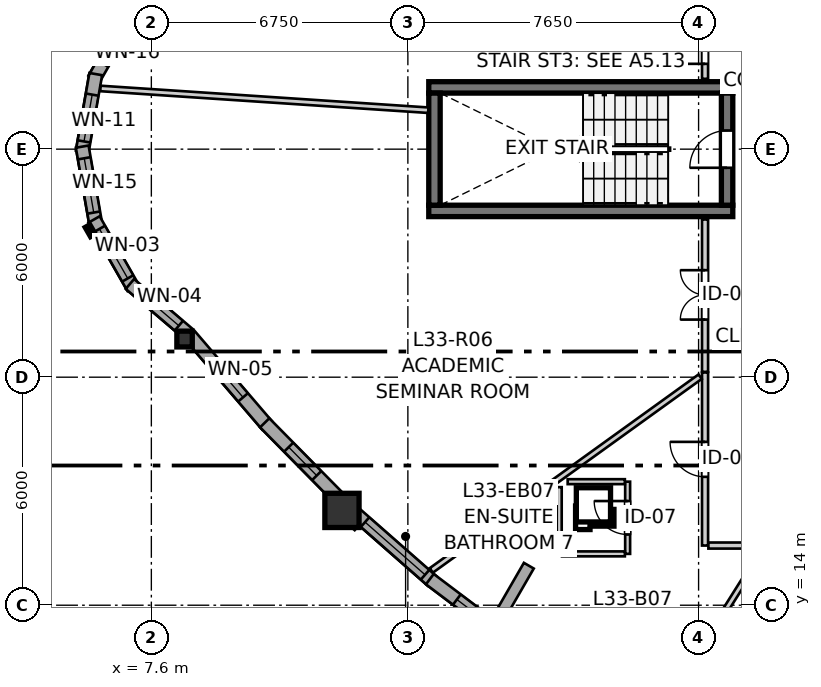
"""IFC4 building model, lengths in metres.
Left out: names, types, materials, properties, quantities, classifications, styles, units other than length and angle.
Written with IfcOpenShell. Run it as: python <this file> out.ifc"""

import sys

from ifc_helpers import new_model, si_unit, direction, frame, frame_2d, origin, origin_2d, place, context, subcontext, project, spatial, rectangle, i_section, extrude, source, transform, mapped, element, fill, save


model = new_model("IFC4")
c1 = context("Model", 3, precision=1e-05, world=origin(), true_north=direction((0.0, 1.0)))
c2 = subcontext(c1, "Body", "Model", "MODEL_VIEW")
j1 = project(units=[si_unit("LENGTHUNIT", "METRE"), si_unit("PLANEANGLEUNIT", "RADIAN")], contexts=[c1])
p1 = place(None, origin())
s1 = spatial("IfcSite", under=j1, at=p1, CompositionType="ELEMENT")
p2 = place(p1, origin())
s2 = spatial("IfcBuilding", under=s1, at=p2, CompositionType="ELEMENT")
p3 = place(p2, frame((0.0, 0.0, 112.0)))
s3 = spatial("IfcBuildingStorey", under=s2, at=p3, CompositionType="ELEMENT", Elevation=112.0)
for number, where, z_axis, x_axis in (
    (1, (14.9, 24.375, 0.0), (0.0, 0.0, 1.0), (1.0, 0.0, 0.0)),
    (2, (22.9, 27.625, 0.0), (0.0, 0.0, 1.0), (-1.0, 0.0, 0.0)),
):
    element("IfcWall", number, at=place(p3, frame(where, z_axis=z_axis, x_axis=x_axis)), inside=s3, PredefinedType="SHEAR", context=c2, shape_type="SweptSolid", body=[
        extrude(rectangle(XDim=8.0, YDim=0.3, at=frame_2d((4.0, 0.0))), origin(), (0.0, 0.0, 1.0), 2.935),
    ])
p4 = place(p3, frame((15.05, 27.475, 0.0), z_axis=(0.0, 0.0, 1.0), x_axis=(0.0, -1.0, 0.0)))
e3 = element("IfcWall", 3, at=p4, inside=s3, PredefinedType="SHEAR", context=c2, shape_type="SweptSolid", body=[
    extrude(rectangle(XDim=2.95, YDim=0.3, at=frame_2d((1.475, 0.0))), origin(), (0.0, 0.0, 1.0), 2.935),
])
p5 = place(p3, frame((22.75, 24.525, 0.0), z_axis=(0.0, 0.0, 1.0), x_axis=(0.0, 1.0, 0.0)))
e4 = element("IfcWall", 4, at=p5, inside=s3, PredefinedType="SHEAR", context=c2, shape_type="SweptSolid", body=[
    extrude(rectangle(XDim=2.95, YDim=0.3, at=frame_2d((1.475, 0.0))), origin(), (0.0, 0.0, 1.0), 2.935),
])
p6 = place(p5, frame((0.985, 0.0, 0.0)))
e5 = element("IfcOpeningElement", 5, at=p6, cuts=e4, PredefinedType="OPENING", context=c2, shape_type="SweptSolid", body=[
    extrude(rectangle(XDim=0.98, YDim=2.15, at=frame_2d((0.49, 1.075))), frame((0.0, 0.16, 0.0), z_axis=(0.0, -1.0, 0.0), x_axis=(1.0, 0.0, 0.0)), (0.0, 0.0, 1.0), 0.32),
])
m1 = source(origin(), c2, "Body", "SweptSolid", [
    extrude(i_section(OverallWidth=0.406, OverallDepth=0.416, WebThickness=0.027, FlangeThickness=0.044, FilletRadius=0.015, at=origin_2d()), origin(), (0.0, 0.0, 1.0), 2.935),
])
p7 = place(p3, frame((8.474, 21.004, 0.0), z_axis=(0.0, 0.0, 1.0), x_axis=(1.0, 0.0, 0.0)))
e6 = element("IfcColumn", 6, at=p7, inside=s3, PredefinedType="PILASTER", context=c2, shape_type="MappedRepresentation", body=[
    mapped(m1, transform((0.0, 0.0, 0.0), x_axis=(1.0, 0.0, 0.0), y_axis=(0.0, 1.0, 0.0), z_axis=(0.0, 0.0, 1.0), scale=1.0)),
])
m2 = source(origin(), c2, "Body", "SweptSolid", [
    extrude(rectangle(XDim=0.9, YDim=0.9, at=origin_2d()), origin(), (0.0, 0.0, 1.0), 2.935),
])
p8 = place(p3, frame((12.616, 16.495, 0.0), z_axis=(0.0, 0.0, 1.0), x_axis=(1.0, 0.0, 0.0)))
e7 = element("IfcColumn", 7, at=p8, inside=s3, PredefinedType="COLUMN", context=c2, shape_type="MappedRepresentation", body=[
    mapped(m2, transform((0.0, 0.0, 0.0), x_axis=(1.0, 0.0, 0.0), y_axis=(0.0, 1.0, 0.0), z_axis=(0.0, 0.0, 1.0), scale=1.0)),
])
p9 = place(p3, frame((7.121, 29.65, 0.0), z_axis=(0.0, 0.0, 1.0), x_axis=(-0.496037473582, -0.868301114132, 0.0)))
e8 = element("IfcWall", 8, at=p9, inside=s3, PredefinedType="SOLIDWALL", context=c2, shape_type="SweptSolid", body=[
    extrude(rectangle(XDim=2.073, YDim=0.34, at=frame_2d((1.037, 0.0))), origin(), (0.0, 0.0, 1.0), 2.465),
])
p10 = place(p9, frame((0.461, 0.0, 0.82)))
e9 = element("IfcOpeningElement", 9, at=p10, cuts=e8, PredefinedType="OPENING", context=c2, shape_type="SweptSolid", body=[
    extrude(rectangle(XDim=1.15, YDim=1.2, at=frame_2d((0.575, 0.6))), frame((0.0, 0.18, 0.0), z_axis=(0.0, -1.0, 0.0), x_axis=(1.0, 0.0, 0.0)), (0.0, 0.0, 1.0), 0.36),
])
p11 = place(p3, frame((6.138, 27.975, 0.0), z_axis=(0.0, 0.0, 1.0), x_axis=(-0.172186061474, -0.985064444711, 0.0)))
e10 = element("IfcWall", 10, at=p11, inside=s3, PredefinedType="SOLIDWALL", context=c2, shape_type="SweptSolid", body=[
    extrude(rectangle(XDim=2.073, YDim=0.34, at=frame_2d((1.037, 0.0))), origin(), (0.0, 0.0, 1.0), 2.465),
])
p12 = place(p11, frame((0.549, 0.0, 0.82)))
e11 = element("IfcOpeningElement", 11, at=p12, cuts=e10, PredefinedType="OPENING", context=c2, shape_type="SweptSolid", body=[
    extrude(rectangle(XDim=1.25, YDim=1.35, at=frame_2d((0.625, 0.675))), frame((0.0, 0.18, 0.0), z_axis=(0.0, -1.0, 0.0), x_axis=(1.0, 0.0, 0.0)), (0.0, 0.0, 1.0), 0.36),
])
p13 = place(p3, frame((5.781, 26.067, 0.0), z_axis=(0.0, 0.0, 1.0), x_axis=(0.172186061474, -0.985064444711, 0.0)))
e12 = element("IfcWall", 12, at=p13, inside=s3, PredefinedType="SOLIDWALL", context=c2, shape_type="SweptSolid", body=[
    extrude(rectangle(XDim=2.073, YDim=0.34, at=frame_2d((1.037, 0.0))), origin(), (0.0, 0.0, 1.0), 2.465),
])
p14 = place(p13, frame((0.312, 0.0, 0.82)))
e13 = element("IfcOpeningElement", 13, at=p14, cuts=e12, PredefinedType="OPENING", context=c2, shape_type="SweptSolid", body=[
    extrude(rectangle(XDim=1.45, YDim=1.25, at=frame_2d((0.725, 0.625))), frame((0.0, 0.18, 0.0), z_axis=(0.0, -1.0, 0.0), x_axis=(1.0, 0.0, 0.0)), (0.0, 0.0, 1.0), 0.36),
])
p15 = place(p3, frame((6.092, 24.15, 0.0), z_axis=(0.0, 0.0, 1.0), x_axis=(0.496037473582, -0.868301114132, 0.0)))
e14 = element("IfcWall", 14, at=p15, inside=s3, PredefinedType="SOLIDWALL", context=c2, shape_type="SweptSolid", body=[
    extrude(rectangle(XDim=2.073, YDim=0.34, at=frame_2d((1.037, 0.0))), origin(), (0.0, 0.0, 1.0), 2.465),
])
p16 = place(p15, frame((0.287, 0.0, 0.82)))
e15 = element("IfcOpeningElement", 15, at=p16, cuts=e14, PredefinedType="OPENING", context=c2, shape_type="SweptSolid", body=[
    extrude(rectangle(XDim=1.5, YDim=1.45, at=frame_2d((0.75, 0.725))), frame((0.0, 0.18, 0.0), z_axis=(0.0, -1.0, 0.0), x_axis=(1.0, 0.0, 0.0)), (0.0, 0.0, 1.0), 0.36),
])
p17 = place(p3, frame((7.035, 22.453, 0.0), z_axis=(0.0, 0.0, 1.0), x_axis=(0.76114353683, -0.648583469063, 0.0)))
e16 = element("IfcWall", 16, at=p17, inside=s3, PredefinedType="SOLIDWALL", context=c2, shape_type="SweptSolid", body=[
    extrude(rectangle(XDim=2.015, YDim=0.34, at=frame_2d((1.007, 0.0))), origin(), (0.0, 0.0, 1.0), 2.465),
])
p18 = place(p17, frame((0.343, 0.0, 0.82)))
e17 = element("IfcOpeningElement", 17, at=p18, cuts=e16, PredefinedType="OPENING", context=c2, shape_type="SweptSolid", body=[
    extrude(rectangle(XDim=1.35, YDim=1.45, at=frame_2d((0.675, 0.725))), frame((0.0, 0.18, 0.0), z_axis=(0.0, -1.0, 0.0), x_axis=(1.0, 0.0, 0.0)), (0.0, 0.0, 1.0), 0.36),
])
p19 = place(p3, frame((8.616, 21.099, 0.0), z_axis=(0.0, 0.0, 1.0), x_axis=(0.650713874475, -0.759323023203, 0.0)))
e18 = element("IfcWall", 18, at=p19, inside=s3, PredefinedType="SOLIDWALL", context=c2, shape_type="SweptSolid", body=[
    extrude(rectangle(XDim=3.113, YDim=0.34, at=frame_2d((1.557, 0.0))), origin(), (0.0, 0.0, 1.0), 2.465),
])
p20 = place(p19, frame((0.947, 0.0, 0.82)))
e19 = element("IfcOpeningElement", 19, at=p20, cuts=e18, PredefinedType="OPENING", context=c2, shape_type="SweptSolid", body=[
    extrude(rectangle(XDim=1.2, YDim=1.45, at=frame_2d((0.6, 0.725))), frame((0.0, 0.18, 0.0), z_axis=(0.0, -1.0, 0.0), x_axis=(1.0, 0.0, 0.0)), (0.0, 0.0, 1.0), 0.36),
])
p21 = place(p3, frame((10.583, 18.8, 0.0), z_axis=(0.0, 0.0, 1.0), x_axis=(0.701884352283, -0.712290920917, 0.0)))
e20 = element("IfcWall", 20, at=p21, inside=s3, PredefinedType="SOLIDWALL", context=c2, shape_type="SweptSolid", body=[
    extrude(rectangle(XDim=2.839, YDim=0.34, at=frame_2d((1.419, 0.0))), origin(), (0.0, 0.0, 1.0), 2.465),
])
p22 = place(p21, frame((0.899, 0.0, 0.82)))
e21 = element("IfcOpeningElement", 21, at=p22, cuts=e20, PredefinedType="OPENING", context=c2, shape_type="SweptSolid", body=[
    extrude(rectangle(XDim=1.05, YDim=1.45, at=frame_2d((0.525, 0.725))), frame((0.0, 0.18, 0.0), z_axis=(0.0, -1.0, 0.0), x_axis=(1.0, 0.0, 0.0)), (0.0, 0.0, 1.0), 0.36),
])
p23 = place(p3, frame((12.901, 16.471, 0.0), z_axis=(0.0, 0.0, 1.0), x_axis=(0.751480442913, -0.659755366722, 0.0)))
e22 = element("IfcWall", 22, at=p23, inside=s3, PredefinedType="SOLIDWALL", context=c2, shape_type="SweptSolid", body=[
    extrude(rectangle(XDim=2.789, YDim=0.34, at=frame_2d((1.395, 0.0))), origin(), (0.0, 0.0, 1.0), 2.465),
])
p24 = place(p23, frame((0.43, 0.0, 0.82)))
e23 = element("IfcOpeningElement", 23, at=p24, cuts=e22, PredefinedType="OPENING", context=c2, shape_type="SweptSolid", body=[
    extrude(rectangle(XDim=2.1, YDim=1.4, at=frame_2d((1.05, 0.7))), frame((0.0, 0.18, 0.0), z_axis=(0.0, -1.0, 0.0), x_axis=(1.0, 0.0, 0.0)), (0.0, 0.0, 1.0), 0.36),
])
p25 = place(p3, frame((14.928, 14.686, 0.0), z_axis=(0.0, 0.0, 1.0), x_axis=(0.798387010211, -0.602144651995, 0.0)))
e24 = element("IfcWall", 24, at=p25, inside=s3, PredefinedType="SOLIDWALL", context=c2, shape_type="SweptSolid", body=[
    extrude(rectangle(XDim=2.966, YDim=0.34, at=frame_2d((1.483, 0.0))), origin(), (0.0, 0.0, 1.0), 2.465),
])
p26 = place(p25, frame((0.891, 0.0, 0.82)))
e25 = element("IfcOpeningElement", 25, at=p26, cuts=e24, PredefinedType="OPENING", context=c2, shape_type="SweptSolid", body=[
    extrude(rectangle(XDim=0.58, YDim=1.35, at=frame_2d((0.29, 0.675))), frame((0.0, 0.18, 0.0), z_axis=(0.0, -1.0, 0.0), x_axis=(1.0, 0.0, 0.0)), (0.0, 0.0, 1.0), 0.36),
])
p27 = place(p3, frame((17.533, 15.04, 0.0), z_axis=(0.0, 0.0, 1.0), x_axis=(-0.499995950774, -0.866027741594, 0.0)))
e26 = element("IfcWall", 26, at=p27, inside=s3, PredefinedType="SOLIDWALL", context=c2, shape_type="SweptSolid", body=[
    extrude(rectangle(XDim=20.091, YDim=0.3, at=frame_2d((10.045, 0.0))), origin(), (0.0, 0.0, 1.0), 2.115),
])
p28 = place(p3, frame((22.17, 15.57, 0.0), z_axis=(0.0, 0.0, 1.0), x_axis=(0.0, 1.0, 0.0)))
e27 = element("IfcWall", 27, at=p28, inside=s3, PredefinedType="PARTITIONING", context=c2, shape_type="SweptSolid", body=[
    extrude(rectangle(XDim=4.555, YDim=0.16, at=frame_2d((2.277, 0.0))), origin(), (0.0, 0.0, 1.0), 2.935),
])
p29 = place(p28, frame((1.808, 0.0, 0.0)))
e28 = element("IfcOpeningElement", 28, at=p29, cuts=e27, PredefinedType="OPENING", context=c2, shape_type="SweptSolid", body=[
    extrude(rectangle(XDim=0.92, YDim=2.1, at=frame_2d((0.46, 1.05))), frame((0.0, 0.09, 0.0), z_axis=(0.0, -1.0, 0.0), x_axis=(1.0, 0.0, 0.0)), (0.0, 0.0, 1.0), 0.18),
])
p30 = place(p3, frame((22.17, 20.14, 0.0), z_axis=(0.0, 0.0, 1.0), x_axis=(0.0, 1.0, 0.0)))
e29 = element("IfcWall", 29, at=p30, inside=s3, PredefinedType="PARTITIONING", context=c2, shape_type="SweptSolid", body=[
    extrude(rectangle(XDim=4.01, YDim=0.16, at=frame_2d((2.005, 0.0))), origin(), (0.0, 0.0, 1.0), 2.935),
])
p31 = place(p30, frame((1.375, 0.0, 0.0)))
e30 = element("IfcOpeningElement", 30, at=p31, cuts=e29, PredefinedType="OPENING", context=c2, shape_type="SweptSolid", body=[
    extrude(rectangle(XDim=1.3, YDim=2.1, at=frame_2d((0.65, 1.05))), frame((0.0, 0.09, 0.0), z_axis=(0.0, -1.0, 0.0), x_axis=(1.0, 0.0, 0.0)), (0.0, 0.0, 1.0), 0.18),
])
p32 = place(p3, frame((22.17, 27.85, 0.0), z_axis=(0.0, 0.0, 1.0), x_axis=(0.0, 1.0, 0.0)))
e31 = element("IfcWall", 31, at=p32, inside=s3, PredefinedType="PARTITIONING", context=c2, shape_type="SweptSolid", body=[
    extrude(rectangle(XDim=2.0, YDim=0.16, at=frame_2d((1.0, 0.0))), origin(), (0.0, 0.0, 1.0), 2.935),
])
p33 = place(p32, frame((0.395, 0.0, 0.0)))
e32 = element("IfcOpeningElement", 32, at=p33, cuts=e31, PredefinedType="OPENING", context=c2, shape_type="SweptSolid", body=[
    extrude(rectangle(XDim=1.3, YDim=2.1, at=frame_2d((0.65, 1.05))), frame((0.0, 0.09, 0.0), z_axis=(0.0, -1.0, 0.0), x_axis=(1.0, 0.0, 0.0)), (0.0, 0.0, 1.0), 0.18),
])
p34 = place(p3, frame((20.133, 15.351, 0.0), z_axis=(0.0, 0.0, 1.0), x_axis=(0.0, 1.0, 0.0)))
e33 = element("IfcWall", 33, at=p34, inside=s3, PredefinedType="PARTITIONING", context=c2, shape_type="SweptSolid", body=[
    extrude(rectangle(XDim=1.9, YDim=0.13, at=frame_2d((0.95, 0.0))), origin(), (0.0, 0.0, 1.0), 2.935),
])
p35 = place(p34, frame((0.51, 0.0, 0.0)))
e34 = element("IfcOpeningElement", 34, at=p35, cuts=e33, PredefinedType="OPENING", context=c2, shape_type="SweptSolid", body=[
    extrude(rectangle(XDim=0.88, YDim=2.05, at=frame_2d((0.44, 1.025))), frame((0.0, 0.075, 0.0), z_axis=(0.0, -1.0, 0.0), x_axis=(1.0, 0.0, 0.0)), (0.0, 0.0, 1.0), 0.15),
])
p36 = place(p3, frame((14.966, 14.915, 0.0), z_axis=(0.0, 0.0, 1.0), x_axis=(0.811310715309, 0.584615192434, 0.0)))
e35 = element("IfcWall", 35, at=p36, inside=s3, PredefinedType="PARTITIONING", context=c2, shape_type="SweptSolid", body=[
    extrude(rectangle(XDim=8.72, YDim=0.145, at=frame_2d((4.36, 0.0))), origin(), (0.0, 0.0, 1.0), 2.103),
])
p37 = place(p3, frame((6.26, 27.597, 0.0), z_axis=(0.0, 0.0, 1.0), x_axis=(0.997805352235, -0.066215398902, 0.0)))
e36 = element("IfcWall", 36, at=p37, inside=s3, PredefinedType="PARTITIONING", context=c2, shape_type="SweptSolid", body=[
    extrude(rectangle(XDim=8.646, YDim=0.145, at=frame_2d((4.323, 0.0))), origin(), (0.0, 0.0, 1.0), 2.935),
])
p38 = place(p3, frame((20.845, 10.914, 0.0), z_axis=(0.0, 0.0, 1.0), x_axis=(0.533007953382, 0.846110230189, 0.0)))
e37 = element("IfcWall", 37, at=p38, inside=s3, PredefinedType="PARTITIONING", context=c2, shape_type="SweptSolid", body=[
    extrude(rectangle(XDim=5.354, YDim=0.145, at=frame_2d((2.677, 0.0))), origin(), (0.0, 0.0, 1.0), 2.935),
])
p39 = place(p3, frame((18.333, 15.351, 0.0), z_axis=(0.0, 0.0, 1.0), x_axis=(0.0, 1.0, 0.0)))
e38 = element("IfcWall", 38, at=p39, inside=s3, PredefinedType="PARTITIONING", context=c2, shape_type="SweptSolid", body=[
    extrude(rectangle(XDim=1.756, YDim=0.13, at=frame_2d((0.878, 0.0))), origin(), (0.0, 0.0, 1.0), 2.935),
])
p40 = place(p3, frame((18.555, 17.251, 0.0), z_axis=(0.0, 0.0, 1.0), x_axis=(1.0, 0.0, 0.0)))
e39 = element("IfcWall", 39, at=p40, inside=s3, PredefinedType="PARTITIONING", context=c2, shape_type="SweptSolid", body=[
    extrude(rectangle(XDim=1.505, YDim=0.13, at=frame_2d((0.752, 0.0))), origin(), (0.0, 0.0, 1.0), 2.935),
])
p41 = place(p3, frame((18.406, 15.351, 0.0), z_axis=(0.0, 0.0, 1.0), x_axis=(1.0, 0.0, 0.0)))
e40 = element("IfcWall", 40, at=p41, inside=s3, PredefinedType="PARTITIONING", context=c2, shape_type="SweptSolid", body=[
    extrude(rectangle(XDim=1.654, YDim=0.13, at=frame_2d((0.827, 0.0))), origin(), (0.0, 0.0, 1.0), 2.935),
])
p42 = place(p3, frame((22.258, 15.57, 0.0), z_axis=(0.0, 0.0, 1.0), x_axis=(1.0, 0.0, 0.0)))
e41 = element("IfcWall", 41, at=p42, inside=s3, PredefinedType="PARTITIONING", context=c2, shape_type="SweptSolid", body=[
    extrude(rectangle(XDim=1.344, YDim=0.16, at=frame_2d((0.672, 0.0))), origin(), (0.0, 0.0, 1.0), 2.935),
])
m3 = source(origin(), c2, "Body", "SweptSolid", [
    extrude(rectangle(XDim=1.15, YDim=1.2, at=frame_2d((0.575, 0.6))), frame((0.0, 0.03, 0.0), z_axis=(0.0, -1.0, 0.0), x_axis=(1.0, 0.0, 0.0)), (0.0, 0.0, 1.0), 0.06),
])
p43 = place(p10, origin())
e42 = element("IfcWindow", 42, at=p43, inside=s3, PartitioningType="SINGLE_PANEL", PredefinedType="WINDOW", context=c2, shape_type="MappedRepresentation", body=[
    mapped(m3, transform((0.0, 0.0, 0.0), x_axis=(1.0, 0.0, 0.0), y_axis=(0.0, 1.0, 0.0), z_axis=(0.0, 0.0, 1.0), scale=1.0)),
])
fill(e9, e42)
m4 = source(origin(), c2, "Body", "SweptSolid", [
    extrude(rectangle(XDim=1.25, YDim=1.35, at=frame_2d((0.625, 0.675))), frame((0.0, 0.03, 0.0), z_axis=(0.0, -1.0, 0.0), x_axis=(1.0, 0.0, 0.0)), (0.0, 0.0, 1.0), 0.06),
])
p44 = place(p12, origin())
e43 = element("IfcWindow", 43, at=p44, inside=s3, PartitioningType="SINGLE_PANEL", PredefinedType="WINDOW", context=c2, shape_type="MappedRepresentation", body=[
    mapped(m4, transform((0.0, 0.0, 0.0), x_axis=(1.0, 0.0, 0.0), y_axis=(0.0, 1.0, 0.0), z_axis=(0.0, 0.0, 1.0), scale=1.0)),
])
fill(e11, e43)
m5 = source(origin(), c2, "Body", "SweptSolid", [
    extrude(rectangle(XDim=1.45, YDim=1.25, at=frame_2d((0.725, 0.625))), frame((0.0, 0.03, 0.0), z_axis=(0.0, -1.0, 0.0), x_axis=(1.0, 0.0, 0.0)), (0.0, 0.0, 1.0), 0.06),
])
p45 = place(p14, origin())
e44 = element("IfcWindow", 44, at=p45, inside=s3, PartitioningType="SINGLE_PANEL", PredefinedType="WINDOW", context=c2, shape_type="MappedRepresentation", body=[
    mapped(m5, transform((0.0, 0.0, 0.0), x_axis=(1.0, 0.0, 0.0), y_axis=(0.0, 1.0, 0.0), z_axis=(0.0, 0.0, 1.0), scale=1.0)),
])
fill(e13, e44)
m6 = source(origin(), c2, "Body", "SweptSolid", [
    extrude(rectangle(XDim=1.5, YDim=1.45, at=frame_2d((0.75, 0.725))), frame((0.0, 0.03, 0.0), z_axis=(0.0, -1.0, 0.0), x_axis=(1.0, 0.0, 0.0)), (0.0, 0.0, 1.0), 0.06),
])
p46 = place(p16, origin())
e45 = element("IfcWindow", 45, at=p46, inside=s3, PartitioningType="SINGLE_PANEL", PredefinedType="WINDOW", context=c2, shape_type="MappedRepresentation", body=[
    mapped(m6, transform((0.0, 0.0, 0.0), x_axis=(1.0, 0.0, 0.0), y_axis=(0.0, 1.0, 0.0), z_axis=(0.0, 0.0, 1.0), scale=1.0)),
])
fill(e15, e45)
m7 = source(origin(), c2, "Body", "SweptSolid", [
    extrude(rectangle(XDim=1.35, YDim=1.45, at=frame_2d((0.675, 0.725))), frame((0.0, 0.03, 0.0), z_axis=(0.0, -1.0, 0.0), x_axis=(1.0, 0.0, 0.0)), (0.0, 0.0, 1.0), 0.06),
])
p47 = place(p18, origin())
e46 = element("IfcWindow", 46, at=p47, inside=s3, PartitioningType="SINGLE_PANEL", PredefinedType="WINDOW", context=c2, shape_type="MappedRepresentation", body=[
    mapped(m7, transform((0.0, 0.0, 0.0), x_axis=(1.0, 0.0, 0.0), y_axis=(0.0, 1.0, 0.0), z_axis=(0.0, 0.0, 1.0), scale=1.0)),
])
fill(e17, e46)
m8 = source(origin(), c2, "Body", "SweptSolid", [
    extrude(rectangle(XDim=1.2, YDim=1.45, at=frame_2d((0.6, 0.725))), frame((0.0, 0.03, 0.0), z_axis=(0.0, -1.0, 0.0), x_axis=(1.0, 0.0, 0.0)), (0.0, 0.0, 1.0), 0.06),
])
p48 = place(p20, origin())
e47 = element("IfcWindow", 47, at=p48, inside=s3, PartitioningType="SINGLE_PANEL", PredefinedType="WINDOW", context=c2, shape_type="MappedRepresentation", body=[
    mapped(m8, transform((0.0, 0.0, 0.0), x_axis=(1.0, 0.0, 0.0), y_axis=(0.0, 1.0, 0.0), z_axis=(0.0, 0.0, 1.0), scale=1.0)),
])
fill(e19, e47)
m9 = source(origin(), c2, "Body", "SweptSolid", [
    extrude(rectangle(XDim=1.05, YDim=1.45, at=frame_2d((0.525, 0.725))), frame((0.0, 0.03, 0.0), z_axis=(0.0, -1.0, 0.0), x_axis=(1.0, 0.0, 0.0)), (0.0, 0.0, 1.0), 0.06),
])
p49 = place(p22, origin())
e48 = element("IfcWindow", 48, at=p49, inside=s3, PartitioningType="SINGLE_PANEL", PredefinedType="WINDOW", context=c2, shape_type="MappedRepresentation", body=[
    mapped(m9, transform((0.0, 0.0, 0.0), x_axis=(1.0, 0.0, 0.0), y_axis=(0.0, 1.0, 0.0), z_axis=(0.0, 0.0, 1.0), scale=1.0)),
])
fill(e21, e48)
m10 = source(origin(), c2, "Body", "SweptSolid", [
    extrude(rectangle(XDim=2.1, YDim=1.4, at=frame_2d((1.05, 0.7))), frame((0.0, 0.03, 0.0), z_axis=(0.0, -1.0, 0.0), x_axis=(1.0, 0.0, 0.0)), (0.0, 0.0, 1.0), 0.06),
])
p50 = place(p24, origin())
e49 = element("IfcWindow", 49, at=p50, inside=s3, PartitioningType="SINGLE_PANEL", PredefinedType="WINDOW", context=c2, shape_type="MappedRepresentation", body=[
    mapped(m10, transform((0.0, 0.0, 0.0), x_axis=(1.0, 0.0, 0.0), y_axis=(0.0, 1.0, 0.0), z_axis=(0.0, 0.0, 1.0), scale=1.0)),
])
fill(e23, e49)
m11 = source(origin(), c2, "Body", "SweptSolid", [
    extrude(rectangle(XDim=0.58, YDim=1.35, at=frame_2d((0.29, 0.675))), frame((0.0, 0.03, 0.0), z_axis=(0.0, -1.0, 0.0), x_axis=(1.0, 0.0, 0.0)), (0.0, 0.0, 1.0), 0.06),
])
p51 = place(p26, origin())
e50 = element("IfcWindow", 50, at=p51, inside=s3, PartitioningType="SINGLE_PANEL", PredefinedType="WINDOW", context=c2, shape_type="MappedRepresentation", body=[
    mapped(m11, transform((0.0, 0.0, 0.0), x_axis=(1.0, 0.0, 0.0), y_axis=(0.0, 1.0, 0.0), z_axis=(0.0, 0.0, 1.0), scale=1.0)),
])
fill(e25, e50)
m12 = source(origin(), c2, "Body", "SweptSolid", [
    extrude(rectangle(XDim=0.98, YDim=2.15, at=frame_2d((0.49, 1.075))), frame((0.0, 0.025, 0.0), z_axis=(0.0, -1.0, 0.0), x_axis=(1.0, 0.0, 0.0)), (0.0, 0.0, 1.0), 0.05),
])
p52 = place(p6, origin())
e51 = element("IfcDoor", 51, at=p52, inside=s3, OperationType="SINGLE_SWING_LEFT", PredefinedType="DOOR", context=c2, shape_type="MappedRepresentation", body=[
    mapped(m12, transform((0.0, 0.0, 0.0), x_axis=(1.0, 0.0, 0.0), y_axis=(0.0, 1.0, 0.0), z_axis=(0.0, 0.0, 1.0), scale=1.0)),
])
fill(e5, e51)
m13 = source(origin(), c2, "Body", "SweptSolid", [
    extrude(rectangle(XDim=0.92, YDim=2.1, at=frame_2d((0.46, 1.05))), frame((0.0, 0.025, 0.0), z_axis=(0.0, -1.0, 0.0), x_axis=(1.0, 0.0, 0.0)), (0.0, 0.0, 1.0), 0.05),
])
p53 = place(p29, origin())
e52 = element("IfcDoor", 52, at=p53, inside=s3, OperationType="SINGLE_SWING_RIGHT", PredefinedType="DOOR", context=c2, shape_type="MappedRepresentation", body=[
    mapped(m13, transform((0.0, 0.0, 0.0), x_axis=(1.0, 0.0, 0.0), y_axis=(0.0, 1.0, 0.0), z_axis=(0.0, 0.0, 1.0), scale=1.0)),
])
fill(e28, e52)
m14 = source(origin(), c2, "Body", "SweptSolid", [
    extrude(rectangle(XDim=1.3, YDim=2.1, at=frame_2d((0.65, 1.05))), frame((0.0, 0.025, 0.0), z_axis=(0.0, -1.0, 0.0), x_axis=(1.0, 0.0, 0.0)), (0.0, 0.0, 1.0), 0.05),
])
p54 = place(p31, origin())
e53 = element("IfcDoor", 53, at=p54, inside=s3, OperationType="DOUBLE_DOOR_SINGLE_SWING", PredefinedType="DOOR", context=c2, shape_type="MappedRepresentation", body=[
    mapped(m14, transform((0.0, 0.0, 0.0), x_axis=(1.0, 0.0, 0.0), y_axis=(0.0, 1.0, 0.0), z_axis=(0.0, 0.0, 1.0), scale=1.0)),
])
fill(e30, e53)
p55 = place(p33, origin())
e54 = element("IfcDoor", 54, at=p55, inside=s3, OperationType="DOUBLE_DOOR_SINGLE_SWING", PredefinedType="DOOR", context=c2, shape_type="MappedRepresentation", body=[
    mapped(m14, transform((0.0, 0.0, 0.0), x_axis=(1.0, 0.0, 0.0), y_axis=(0.0, 1.0, 0.0), z_axis=(0.0, 0.0, 1.0), scale=1.0)),
])
fill(e32, e54)
m15 = source(origin(), c2, "Body", "SweptSolid", [
    extrude(rectangle(XDim=0.88, YDim=2.05, at=frame_2d((0.44, 1.025))), frame((0.0, 0.025, 0.0), z_axis=(0.0, -1.0, 0.0), x_axis=(1.0, 0.0, 0.0)), (0.0, 0.0, 1.0), 0.05),
])
p56 = place(p35, origin())
e55 = element("IfcDoor", 55, at=p56, inside=s3, OperationType="SINGLE_SWING_RIGHT", PredefinedType="DOOR", context=c2, shape_type="MappedRepresentation", body=[
    mapped(m15, transform((0.0, 0.0, 0.0), x_axis=(1.0, 0.0, 0.0), y_axis=(0.0, 1.0, 0.0), z_axis=(0.0, 0.0, 1.0), scale=1.0)),
])
fill(e34, e55)
save(model, sys.argv[1])
